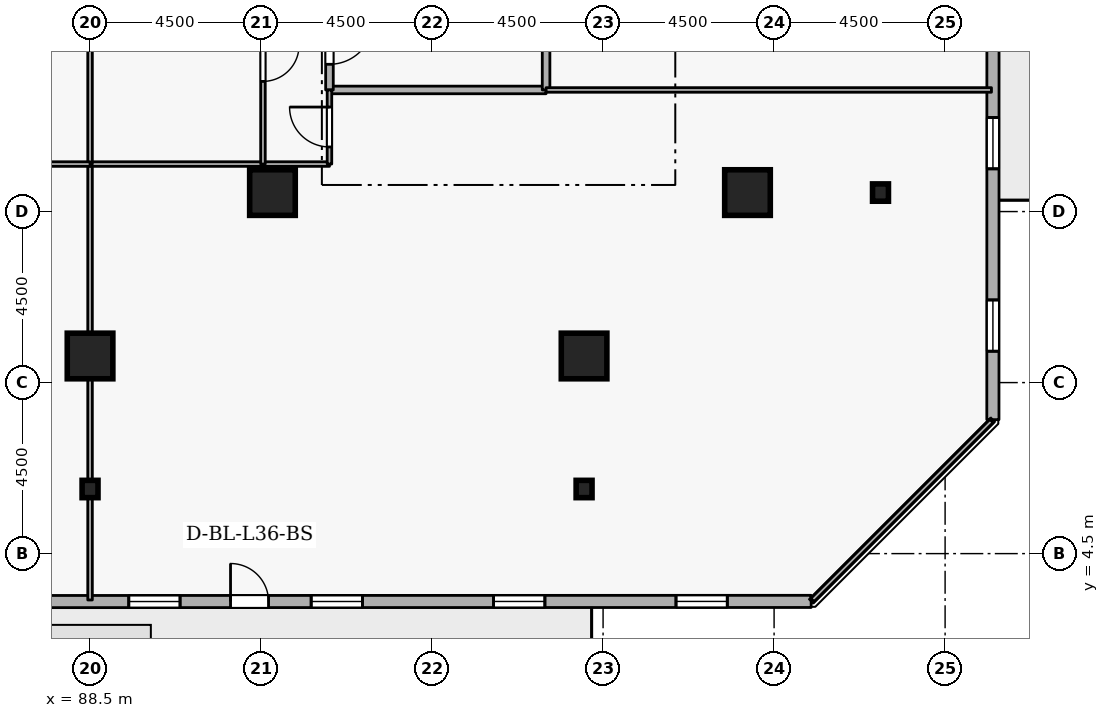
"""IFC4 building model, lengths in metres.
Left out: names, types, materials, properties, quantities, classifications, styles, units other than length and angle.
Written with IfcOpenShell. Run it as: python <this file> out.ifc"""

import sys

from ifc_helpers import new_model, si_unit, direction, frame, frame_2d, origin, origin_2d, place, context, subcontext, project, spatial, rectangle, i_section, extrude, element, fill, save


model = new_model("IFC4")
c1 = context("Model", 3, precision=1e-05, world=origin(), true_north=direction((0.0, 1.0)))
c2 = subcontext(c1, "Body", "Model", "MODEL_VIEW")
j1 = project(units=[si_unit("LENGTHUNIT", "METRE"), si_unit("PLANEANGLEUNIT", "RADIAN")], contexts=[c1])
p1 = place(None, origin())
s1 = spatial("IfcSite", under=j1, at=p1, CompositionType="ELEMENT")
p2 = place(p1, origin())
s2 = spatial("IfcBuilding", under=s1, at=p2, CompositionType="ELEMENT")
p3 = place(p2, frame((0.0, 0.0, 137.7)))
s3 = spatial("IfcBuildingStorey", under=s2, at=p3, CompositionType="ELEMENT", Elevation=137.7)
for number, where, z_axis, x_axis in (
    (1, (105.8, 14.0, 0.0), (0.0, 0.0, 1.0), (1.0, 0.0, 0.0)),
    (2, (101.5, 9.7, 0.0), (0.0, 0.0, 1.0), (1.0, 0.0, 0.0)),
    (3, (88.5, 9.7, 0.0), (0.0, 0.0, 1.0), (1.0, 0.0, 0.0)),
    (4, (93.3, 14.0, 0.0), (0.0, 0.0, 1.0), (1.0, 0.0, 0.0)),
):
    element("IfcColumn", number, at=place(p3, frame(where, z_axis=z_axis, x_axis=x_axis)), inside=s3, PredefinedType="COLUMN", context=c2, shape_type="SweptSolid", body=[
        extrude(rectangle(XDim=1.2, YDim=1.2, at=origin_2d()), origin(), (0.0, 0.0, 1.0), 3.6),
    ])
for number, where, z_axis, x_axis in (
    (5, (109.3, 14.0, 0.0), (0.0, 0.0, 1.0), (1.0, 0.0, 0.0)),
    (6, (101.5, 6.2, 0.0), (0.0, 0.0, 1.0), (1.0, 0.0, 0.0)),
    (7, (88.5, 6.2, 0.0), (0.0, 0.0, 1.0), (1.0, 0.0, 0.0)),
):
    element("IfcColumn", number, at=place(p3, frame(where, z_axis=z_axis, x_axis=x_axis)), inside=s3, PredefinedType="COLUMN", context=c2, shape_type="SweptSolid", body=[
        extrude(i_section(OverallWidth=0.418, OverallDepth=0.456, WebThickness=0.042, FlangeThickness=0.067, FilletRadius=0.015, at=origin_2d()), origin(), (0.0, 0.0, 1.0), 3.6),
    ])
p4 = place(p3, frame((73.319, 3.235, 0.0), z_axis=(0.0, 0.0, 1.0), x_axis=(0.99999997701, 0.000214431216, 0.0)))
e8 = element("IfcWall", 8, at=p4, inside=s3, PredefinedType="STANDARD", context=c2, shape_type="SweptSolid", body=[
    extrude(rectangle(XDim=34.156, YDim=0.32, at=frame_2d((17.078, 0.0))), origin(), (0.0, 0.0, 1.0), 2.66),
])
p5 = place(p4, frame((18.878, 0.0, 0.0)))
e9 = element("IfcOpeningElement", 9, at=p5, cuts=e8, PredefinedType="OPENING", context=c2, shape_type="SweptSolid", body=[
    extrude(rectangle(XDim=1.0, YDim=2.08, at=frame_2d((0.5, 1.04))), frame((0.0, 0.17, 0.0), z_axis=(0.0, -1.0, 0.0), x_axis=(1.0, 0.0, 0.0)), (0.0, 0.0, 1.0), 0.34),
])
p6 = place(p4, frame((1.8, 0.0, 0.72)))
e10 = element("IfcOpeningElement", 10, at=p6, cuts=e8, PredefinedType="OPENING", context=c2, shape_type="SweptSolid", body=[
    extrude(rectangle(XDim=1.35, YDim=1.05, at=frame_2d((0.675, 0.525))), frame((0.0, 0.17, 0.0), z_axis=(0.0, -1.0, 0.0), x_axis=(1.0, 0.0, 0.0)), (0.0, 0.0, 1.0), 0.34),
])
p7 = place(p4, frame((6.6, 0.0, 0.72)))
e11 = element("IfcOpeningElement", 11, at=p7, cuts=e8, PredefinedType="OPENING", context=c2, shape_type="SweptSolid", body=[
    extrude(rectangle(XDim=1.35, YDim=1.05, at=frame_2d((0.675, 0.525))), frame((0.0, 0.17, 0.0), z_axis=(0.0, -1.0, 0.0), x_axis=(1.0, 0.0, 0.0)), (0.0, 0.0, 1.0), 0.34),
])
p8 = place(p4, frame((11.4, 0.0, 0.72)))
e12 = element("IfcOpeningElement", 12, at=p8, cuts=e8, PredefinedType="OPENING", context=c2, shape_type="SweptSolid", body=[
    extrude(rectangle(XDim=1.35, YDim=1.05, at=frame_2d((0.675, 0.525))), frame((0.0, 0.17, 0.0), z_axis=(0.0, -1.0, 0.0), x_axis=(1.0, 0.0, 0.0)), (0.0, 0.0, 1.0), 0.34),
])
p9 = place(p4, frame((16.2, 0.0, 0.72)))
e13 = element("IfcOpeningElement", 13, at=p9, cuts=e8, PredefinedType="OPENING", context=c2, shape_type="SweptSolid", body=[
    extrude(rectangle(XDim=1.35, YDim=1.05, at=frame_2d((0.675, 0.525))), frame((0.0, 0.17, 0.0), z_axis=(0.0, -1.0, 0.0), x_axis=(1.0, 0.0, 0.0)), (0.0, 0.0, 1.0), 0.34),
])
p10 = place(p4, frame((21.0, 0.0, 0.72)))
e14 = element("IfcOpeningElement", 14, at=p10, cuts=e8, PredefinedType="OPENING", context=c2, shape_type="SweptSolid", body=[
    extrude(rectangle(XDim=1.35, YDim=1.05, at=frame_2d((0.675, 0.525))), frame((0.0, 0.17, 0.0), z_axis=(0.0, -1.0, 0.0), x_axis=(1.0, 0.0, 0.0)), (0.0, 0.0, 1.0), 0.34),
])
p11 = place(p4, frame((25.8, 0.0, 0.72)))
e15 = element("IfcOpeningElement", 15, at=p11, cuts=e8, PredefinedType="OPENING", context=c2, shape_type="SweptSolid", body=[
    extrude(rectangle(XDim=1.35, YDim=1.05, at=frame_2d((0.675, 0.525))), frame((0.0, 0.17, 0.0), z_axis=(0.0, -1.0, 0.0), x_axis=(1.0, 0.0, 0.0)), (0.0, 0.0, 1.0), 0.34),
])
p12 = place(p4, frame((30.6, 0.0, 0.72)))
e16 = element("IfcOpeningElement", 16, at=p12, cuts=e8, PredefinedType="OPENING", context=c2, shape_type="SweptSolid", body=[
    extrude(rectangle(XDim=1.35, YDim=1.05, at=frame_2d((0.675, 0.525))), frame((0.0, 0.17, 0.0), z_axis=(0.0, -1.0, 0.0), x_axis=(1.0, 0.0, 0.0)), (0.0, 0.0, 1.0), 0.34),
])
p13 = place(p3, frame((112.257, 8.025, 0.0), z_axis=(0.0, 0.0, 1.0), x_axis=(0.000214431216, 0.99999997701, 0.0)))
e17 = element("IfcWall", 17, at=p13, inside=s3, PredefinedType="STANDARD", context=c2, shape_type="SweptSolid", body=[
    extrude(rectangle(XDim=34.156, YDim=0.32, at=frame_2d((17.078, 0.0))), origin(), (0.0, 0.0, 1.0), 2.66),
])
p14 = place(p13, frame((27.428, 0.0, 0.0)))
e18 = element("IfcOpeningElement", 18, at=p14, cuts=e17, PredefinedType="OPENING", context=c2, shape_type="SweptSolid", body=[
    extrude(rectangle(XDim=1.0, YDim=2.08, at=frame_2d((0.5, 1.04))), frame((0.0, 0.17, 0.0), z_axis=(0.0, -1.0, 0.0), x_axis=(1.0, 0.0, 0.0)), (0.0, 0.0, 1.0), 0.34),
])
p15 = place(p13, frame((1.8, 0.0, 0.72)))
e19 = element("IfcOpeningElement", 19, at=p15, cuts=e17, PredefinedType="OPENING", context=c2, shape_type="SweptSolid", body=[
    extrude(rectangle(XDim=1.35, YDim=1.05, at=frame_2d((0.675, 0.525))), frame((0.0, 0.17, 0.0), z_axis=(0.0, -1.0, 0.0), x_axis=(1.0, 0.0, 0.0)), (0.0, 0.0, 1.0), 0.34),
])
p16 = place(p13, frame((6.6, 0.0, 0.72)))
e20 = element("IfcOpeningElement", 20, at=p16, cuts=e17, PredefinedType="OPENING", context=c2, shape_type="SweptSolid", body=[
    extrude(rectangle(XDim=1.35, YDim=1.05, at=frame_2d((0.675, 0.525))), frame((0.0, 0.17, 0.0), z_axis=(0.0, -1.0, 0.0), x_axis=(1.0, 0.0, 0.0)), (0.0, 0.0, 1.0), 0.34),
])
p17 = place(p13, frame((11.4, 0.0, 0.72)))
e21 = element("IfcOpeningElement", 21, at=p17, cuts=e17, PredefinedType="OPENING", context=c2, shape_type="SweptSolid", body=[
    extrude(rectangle(XDim=1.35, YDim=1.05, at=frame_2d((0.675, 0.525))), frame((0.0, 0.17, 0.0), z_axis=(0.0, -1.0, 0.0), x_axis=(1.0, 0.0, 0.0)), (0.0, 0.0, 1.0), 0.34),
])
p18 = place(p13, frame((16.2, 0.0, 0.72)))
e22 = element("IfcOpeningElement", 22, at=p18, cuts=e17, PredefinedType="OPENING", context=c2, shape_type="SweptSolid", body=[
    extrude(rectangle(XDim=1.35, YDim=1.05, at=frame_2d((0.675, 0.525))), frame((0.0, 0.17, 0.0), z_axis=(0.0, -1.0, 0.0), x_axis=(1.0, 0.0, 0.0)), (0.0, 0.0, 1.0), 0.34),
])
p19 = place(p13, frame((21.0, 0.0, 0.72)))
e23 = element("IfcOpeningElement", 23, at=p19, cuts=e17, PredefinedType="OPENING", context=c2, shape_type="SweptSolid", body=[
    extrude(rectangle(XDim=1.35, YDim=1.05, at=frame_2d((0.675, 0.525))), frame((0.0, 0.17, 0.0), z_axis=(0.0, -1.0, 0.0), x_axis=(1.0, 0.0, 0.0)), (0.0, 0.0, 1.0), 0.34),
])
p20 = place(p13, frame((30.6, 0.0, 0.72)))
e24 = element("IfcOpeningElement", 24, at=p20, cuts=e17, PredefinedType="OPENING", context=c2, shape_type="SweptSolid", body=[
    extrude(rectangle(XDim=1.35, YDim=1.05, at=frame_2d((0.675, 0.525))), frame((0.0, 0.17, 0.0), z_axis=(0.0, -1.0, 0.0), x_axis=(1.0, 0.0, 0.0)), (0.0, 0.0, 1.0), 0.34),
])
p21 = place(p3, frame((94.8, 16.7, 0.0), z_axis=(0.0, 0.0, 1.0), x_axis=(1.0, 0.0, 0.0)))
e25 = element("IfcWall", 25, at=p21, inside=s3, PredefinedType="STANDARD", context=c2, shape_type="SweptSolid", body=[
    extrude(rectangle(XDim=5.7, YDim=0.2, at=frame_2d((2.85, 0.0))), origin(), (0.0, 0.0, 1.0), 3.26),
])
p22 = place(p3, frame((100.5, 16.7, 0.0), z_axis=(0.0, 0.0, 1.0), x_axis=(0.0, 1.0, 0.0)))
e26 = element("IfcWall", 26, at=p22, inside=s3, PredefinedType="STANDARD", context=c2, shape_type="SweptSolid", body=[
    extrude(rectangle(XDim=2.5, YDim=0.2, at=frame_2d((1.25, 0.0))), origin(), (0.0, 0.0, 1.0), 3.26),
])
p23 = place(p3, frame((94.8, 19.2, 0.0), z_axis=(0.0, 0.0, 1.0), x_axis=(0.0, -1.0, 0.0)))
e27 = element("IfcWall", 27, at=p23, inside=s3, PredefinedType="STANDARD", context=c2, shape_type="SweptSolid", body=[
    extrude(rectangle(XDim=2.5, YDim=0.2, at=frame_2d((1.25, 0.0))), origin(), (0.0, 0.0, 1.0), 3.26),
])
p24 = place(p23, frame((0.675, 0.0, 0.0)))
e28 = element("IfcOpeningElement", 28, at=p24, cuts=e27, PredefinedType="OPENING", context=c2, shape_type="SweptSolid", body=[
    extrude(rectangle(XDim=1.15, YDim=2.1, at=frame_2d((0.575, 1.05))), frame((0.0, 0.11, 0.0), z_axis=(0.0, -1.0, 0.0), x_axis=(1.0, 0.0, 0.0)), (0.0, 0.0, 1.0), 0.22),
])
p25 = place(p3, frame((88.5, 3.28, 0.0), z_axis=(0.0, 0.0, 1.0), x_axis=(0.0, 1.0, 0.0)))
e29 = element("IfcWall", 29, at=p25, inside=s3, PredefinedType="PARTITIONING", context=c2, shape_type="SweptSolid", body=[
    extrude(rectangle(XDim=11.47, YDim=0.12, at=frame_2d((5.735, 0.0))), origin(), (0.0, 0.0, 1.0), 2.802),
])
p26 = place(p3, frame((88.5, 14.75, 0.0), z_axis=(0.0, 0.0, 1.0), x_axis=(1.0, 0.0, 0.0)))
e30 = element("IfcWall", 30, at=p26, inside=s3, PredefinedType="PARTITIONING", context=c2, shape_type="SweptSolid", body=[
    extrude(rectangle(XDim=4.55, YDim=0.12, at=frame_2d((2.275, 0.0))), origin(), (0.0, 0.0, 1.0), 3.26),
])
p27 = place(p3, frame((93.05, 14.75, 0.0), z_axis=(0.0, 0.0, 1.0), x_axis=(1.0, 0.0, 0.0)))
e31 = element("IfcWall", 31, at=p27, inside=s3, PredefinedType="PARTITIONING", context=c2, shape_type="SweptSolid", body=[
    extrude(rectangle(XDim=1.75, YDim=0.12, at=frame_2d((0.875, 0.0))), origin(), (0.0, 0.0, 1.0), 3.26),
])
p28 = place(p3, frame((94.8, 14.75, 0.0), z_axis=(0.0, 0.0, 1.0), x_axis=(0.0, 1.0, 0.0)))
e32 = element("IfcWall", 32, at=p28, inside=s3, PredefinedType="PARTITIONING", context=c2, shape_type="SweptSolid", body=[
    extrude(rectangle(XDim=1.95, YDim=0.12, at=frame_2d((0.975, 0.0))), origin(), (0.0, 0.0, 1.0), 3.26),
])
p29 = place(p28, frame((0.45, 0.0, 0.0)))
e33 = element("IfcOpeningElement", 33, at=p29, cuts=e32, PredefinedType="OPENING", context=c2, shape_type="SweptSolid", body=[
    extrude(rectangle(XDim=1.05, YDim=2.1, at=frame_2d((0.525, 1.05))), frame((0.0, 0.07, 0.0), z_axis=(0.0, -1.0, 0.0), x_axis=(1.0, 0.0, 0.0)), (0.0, 0.0, 1.0), 0.14),
])
p30 = place(p3, frame((100.5, 16.7, 0.0), z_axis=(0.0, 0.0, 1.0), x_axis=(1.0, 0.0, 0.0)))
e34 = element("IfcWall", 34, at=p30, inside=s3, PredefinedType="PARTITIONING", context=c2, shape_type="SweptSolid", body=[
    extrude(rectangle(XDim=11.72, YDim=0.12, at=frame_2d((5.86, 0.0))), origin(), (0.0, 0.0, 1.0), 3.26),
])
p31 = place(p3, frame((112.22, 7.99, 0.0), z_axis=(0.0, 0.0, 1.0), x_axis=(-0.707106781187, -0.707106781187, 0.0)))
e35 = element("IfcWall", 35, at=p31, inside=s3, PredefinedType="PARTITIONING", context=c2, shape_type="SweptSolid", body=[
    extrude(rectangle(XDim=6.66, YDim=0.12, at=frame_2d((3.33, 0.0))), origin(), (0.0, 0.0, 1.0), 3.26),
])
p32 = place(p3, frame((88.5, 14.75, 0.0), z_axis=(0.0, 0.0, 1.0), x_axis=(0.0, 1.0, 0.0)))
e36 = element("IfcWall", 36, at=p32, inside=s3, PredefinedType="PARTITIONING", context=c2, shape_type="SweptSolid", body=[
    extrude(rectangle(XDim=5.3, YDim=0.12, at=frame_2d((2.65, 0.0))), origin(), (0.0, 0.0, 1.0), 3.26),
])
p33 = place(p3, frame((93.05, 20.05, 0.0), z_axis=(0.0, 0.0, 1.0), x_axis=(0.0, -1.0, 0.0)))
e37 = element("IfcWall", 37, at=p33, inside=s3, PredefinedType="PARTITIONING", context=c2, shape_type="SweptSolid", body=[
    extrude(rectangle(XDim=5.3, YDim=0.12, at=frame_2d((2.65, 0.0))), origin(), (0.0, 0.0, 1.0), 3.26),
])
p34 = place(p33, frame((2.175, 0.0, 0.0)))
e38 = element("IfcOpeningElement", 38, at=p34, cuts=e37, PredefinedType="OPENING", context=c2, shape_type="SweptSolid", body=[
    extrude(rectangle(XDim=0.95, YDim=2.1, at=frame_2d((0.475, 1.05))), frame((0.0, 0.07, 0.0), z_axis=(0.0, -1.0, 0.0), x_axis=(1.0, 0.0, 0.0)), (0.0, 0.0, 1.0), 0.14),
])
p35 = place(p3, frame((88.5, 14.75, 0.0), z_axis=(0.0, 0.0, 1.0), x_axis=(-1.0, 0.0, 0.0)))
e39 = element("IfcWall", 39, at=p35, inside=s3, PredefinedType="PARTITIONING", context=c2, shape_type="SweptSolid", body=[
    extrude(rectangle(XDim=2.3, YDim=0.12, at=frame_2d((1.15, 0.0))), origin(), (0.0, 0.0, 1.0), 3.26),
])
p36 = place(p5, origin())
e40 = element("IfcDoor", 40, at=p36, inside=s3, OperationType="SINGLE_SWING_LEFT", PredefinedType="DOOR", context=c2, shape_type="SweptSolid", body=[
    extrude(rectangle(XDim=1.0, YDim=2.08, at=frame_2d((0.5, 1.04))), frame((0.0, 0.025, 0.0), z_axis=(0.0, -1.0, 0.0), x_axis=(1.0, 0.0, 0.0)), (0.0, 0.0, 1.0), 0.05),
])
fill(e9, e40)
p37 = place(p9, origin())
e41 = element("IfcWindow", 41, at=p37, inside=s3, PartitioningType="SINGLE_PANEL", PredefinedType="WINDOW", context=c2, shape_type="SweptSolid", body=[
    extrude(rectangle(XDim=1.35, YDim=1.05, at=frame_2d((0.675, 0.525))), frame((0.0, 0.03, 0.0), z_axis=(0.0, -1.0, 0.0), x_axis=(1.0, 0.0, 0.0)), (0.0, 0.0, 1.0), 0.06),
])
fill(e13, e41)
p38 = place(p10, origin())
e42 = element("IfcWindow", 42, at=p38, inside=s3, PartitioningType="SINGLE_PANEL", PredefinedType="WINDOW", context=c2, shape_type="SweptSolid", body=[
    extrude(rectangle(XDim=1.35, YDim=1.05, at=frame_2d((0.675, 0.525))), frame((0.0, 0.03, 0.0), z_axis=(0.0, -1.0, 0.0), x_axis=(1.0, 0.0, 0.0)), (0.0, 0.0, 1.0), 0.06),
])
fill(e14, e42)
p39 = place(p11, origin())
e43 = element("IfcWindow", 43, at=p39, inside=s3, PartitioningType="SINGLE_PANEL", PredefinedType="WINDOW", context=c2, shape_type="SweptSolid", body=[
    extrude(rectangle(XDim=1.35, YDim=1.05, at=frame_2d((0.675, 0.525))), frame((0.0, 0.03, 0.0), z_axis=(0.0, -1.0, 0.0), x_axis=(1.0, 0.0, 0.0)), (0.0, 0.0, 1.0), 0.06),
])
fill(e15, e43)
p40 = place(p12, origin())
e44 = element("IfcWindow", 44, at=p40, inside=s3, PartitioningType="SINGLE_PANEL", PredefinedType="WINDOW", context=c2, shape_type="SweptSolid", body=[
    extrude(rectangle(XDim=1.35, YDim=1.05, at=frame_2d((0.675, 0.525))), frame((0.0, 0.03, 0.0), z_axis=(0.0, -1.0, 0.0), x_axis=(1.0, 0.0, 0.0)), (0.0, 0.0, 1.0), 0.06),
])
fill(e16, e44)
p41 = place(p15, origin())
e45 = element("IfcWindow", 45, at=p41, inside=s3, PartitioningType="SINGLE_PANEL", PredefinedType="WINDOW", context=c2, shape_type="SweptSolid", body=[
    extrude(rectangle(XDim=1.35, YDim=1.05, at=frame_2d((0.675, 0.525))), frame((0.0, 0.03, 0.0), z_axis=(0.0, -1.0, 0.0), x_axis=(1.0, 0.0, 0.0)), (0.0, 0.0, 1.0), 0.06),
])
fill(e19, e45)
p42 = place(p16, origin())
e46 = element("IfcWindow", 46, at=p42, inside=s3, PartitioningType="SINGLE_PANEL", PredefinedType="WINDOW", context=c2, shape_type="SweptSolid", body=[
    extrude(rectangle(XDim=1.35, YDim=1.05, at=frame_2d((0.675, 0.525))), frame((0.0, 0.03, 0.0), z_axis=(0.0, -1.0, 0.0), x_axis=(1.0, 0.0, 0.0)), (0.0, 0.0, 1.0), 0.06),
])
fill(e20, e46)
p43 = place(p24, origin())
e47 = element("IfcDoor", 47, at=p43, inside=s3, OperationType="SINGLE_SWING_LEFT", PredefinedType="DOOR", context=c2, shape_type="SweptSolid", body=[
    extrude(rectangle(XDim=1.15, YDim=2.1, at=frame_2d((0.575, 1.05))), frame((0.0, 0.025, 0.0), z_axis=(0.0, -1.0, 0.0), x_axis=(1.0, 0.0, 0.0)), (0.0, 0.0, 1.0), 0.05),
])
fill(e28, e47)
p44 = place(p29, origin())
e48 = element("IfcDoor", 48, at=p44, inside=s3, OperationType="SINGLE_SWING_RIGHT", PredefinedType="DOOR", context=c2, shape_type="SweptSolid", body=[
    extrude(rectangle(XDim=1.05, YDim=2.1, at=frame_2d((0.525, 1.05))), frame((0.0, 0.025, 0.0), z_axis=(0.0, -1.0, 0.0), x_axis=(1.0, 0.0, 0.0)), (0.0, 0.0, 1.0), 0.05),
])
fill(e33, e48)
p45 = place(p34, origin())
e49 = element("IfcDoor", 49, at=p45, inside=s3, OperationType="SINGLE_SWING_LEFT", PredefinedType="DOOR", context=c2, shape_type="SweptSolid", body=[
    extrude(rectangle(XDim=0.95, YDim=2.1, at=frame_2d((0.475, 1.05))), frame((0.0, 0.025, 0.0), z_axis=(0.0, -1.0, 0.0), x_axis=(1.0, 0.0, 0.0)), (0.0, 0.0, 1.0), 0.05),
])
fill(e38, e49)
save(model, sys.argv[1])
